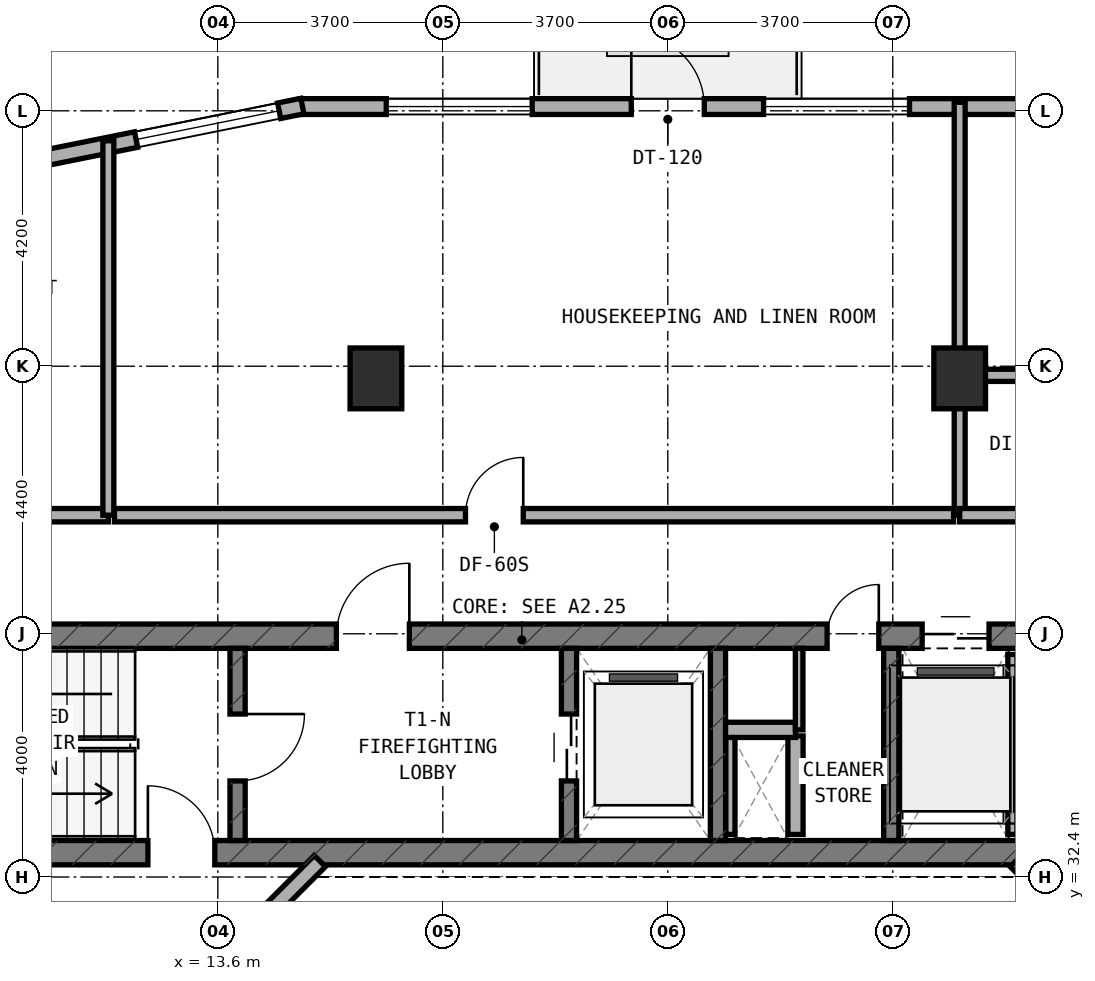
"""IFC4 building model, lengths in metres.
Left out: names, types, materials, properties, quantities, classifications, styles, units other than length and angle.
Written with IfcOpenShell. Run it as: python <this file> out.ifc"""

import sys

from ifc_helpers import new_model, si_unit, direction, frame, frame_2d, origin, origin_2d, place, context, subcontext, project, spatial, rectangle, extrude, element, fill, save


model = new_model("IFC4")
c1 = context("Model", 3, precision=1e-05, world=origin(), true_north=direction((0.0, 1.0)))
c2 = subcontext(c1, "Body", "Model", "MODEL_VIEW")
j1 = project(units=[si_unit("LENGTHUNIT", "METRE"), si_unit("PLANEANGLEUNIT", "RADIAN")], contexts=[c1])
p1 = place(None, origin())
s1 = spatial("IfcSite", under=j1, at=p1, CompositionType="ELEMENT")
p2 = place(p1, origin())
s2 = spatial("IfcBuilding", under=s1, at=p2, CompositionType="ELEMENT")
p3 = place(p2, frame((0.0, 0.0, 112.5)))
s3 = spatial("IfcBuildingStorey", under=s2, at=p3, CompositionType="ELEMENT", Elevation=112.5)
p4 = place(p3, frame((6.4, 32.8, 0.0), z_axis=(0.0, 0.0, 1.0), x_axis=(1.0, 0.0, 0.0)))
e1 = element("IfcWall", 1, at=p4, inside=s3, PredefinedType="SHEAR", context=c2, shape_type="SweptSolid", body=[
    extrude(rectangle(XDim=24.4, YDim=0.4, at=frame_2d((12.2, 0.0))), origin(), (0.0, 0.0, 1.0), 3.5),
])
p5 = place(p4, frame((6.05, 0.0, 0.0)))
e2 = element("IfcOpeningElement", 2, at=p5, cuts=e1, PredefinedType="OPENING", context=c2, shape_type="SweptSolid", body=[
    extrude(rectangle(XDim=1.1, YDim=2.15, at=frame_2d((0.55, 1.075))), frame((0.0, 0.21, 0.0), z_axis=(0.0, -1.0, 0.0), x_axis=(1.0, 0.0, 0.0)), (0.0, 0.0, 1.0), 0.42),
])
p6 = place(p3, frame((6.4, 36.36, 0.0), z_axis=(0.0, 0.0, 1.0), x_axis=(1.0, 0.0, 0.0)))
e3 = element("IfcWall", 3, at=p6, inside=s3, PredefinedType="SHEAR", context=c2, shape_type="SweptSolid", body=[
    extrude(rectangle(XDim=24.4, YDim=0.4, at=frame_2d((12.2, 0.0))), origin(), (0.0, 0.0, 1.0), 3.5),
])
p7 = place(p6, frame((9.15, 0.0, 0.0)))
e4 = element("IfcOpeningElement", 4, at=p7, cuts=e3, PredefinedType="OPENING", context=c2, shape_type="SweptSolid", body=[
    extrude(rectangle(XDim=1.2, YDim=2.15, at=frame_2d((0.6, 1.075))), frame((0.0, 0.21, 0.0), z_axis=(0.0, -1.0, 0.0), x_axis=(1.0, 0.0, 0.0)), (0.0, 0.0, 1.0), 0.42),
])
p8 = place(p6, frame((17.22, 0.0, 0.0)))
e5 = element("IfcOpeningElement", 5, at=p8, cuts=e3, PredefinedType="OPENING", context=c2, shape_type="SweptSolid", body=[
    extrude(rectangle(XDim=0.85, YDim=2.1, at=frame_2d((0.425, 1.05))), frame((0.0, 0.21, 0.0), z_axis=(0.0, -1.0, 0.0), x_axis=(1.0, 0.0, 0.0)), (0.0, 0.0, 1.0), 0.42),
])
p9 = place(p6, frame((18.783, 0.0, 0.0)))
e6 = element("IfcOpeningElement", 6, at=p9, cuts=e3, PredefinedType="OPENING", context=c2, shape_type="SweptSolid", body=[
    extrude(rectangle(XDim=1.1, YDim=2.15, at=frame_2d((0.55, 1.075))), frame((0.0, 0.21, 0.0), z_axis=(0.0, -1.0, 0.0), x_axis=(1.0, 0.0, 0.0)), (0.0, 0.0, 1.0), 0.42),
])
p10 = place(p6, frame((20.65, 0.0, 0.0)))
e7 = element("IfcOpeningElement", 7, at=p10, cuts=e3, PredefinedType="OPENING", context=c2, shape_type="SweptSolid", body=[
    extrude(rectangle(XDim=1.1, YDim=2.15, at=frame_2d((0.55, 1.075))), frame((0.0, 0.21, 0.0), z_axis=(0.0, -1.0, 0.0), x_axis=(1.0, 0.0, 0.0)), (0.0, 0.0, 1.0), 0.42),
])
p11 = place(p6, frame((22.517, 0.0, 0.0)))
e8 = element("IfcOpeningElement", 8, at=p11, cuts=e3, PredefinedType="OPENING", context=c2, shape_type="SweptSolid", body=[
    extrude(rectangle(XDim=1.1, YDim=2.15, at=frame_2d((0.55, 1.075))), frame((0.0, 0.21, 0.0), z_axis=(0.0, -1.0, 0.0), x_axis=(1.0, 0.0, 0.0)), (0.0, 0.0, 1.0), 0.42),
])
p12 = place(p3, frame((13.925, 33.0, 0.0), z_axis=(0.0, 0.0, 1.0), x_axis=(0.0, 1.0, 0.0)))
e9 = element("IfcWall", 9, at=p12, inside=s3, PredefinedType="STANDARD", context=c2, shape_type="SweptSolid", body=[
    extrude(rectangle(XDim=3.16, YDim=0.25, at=frame_2d((1.58, 0.0))), origin(), (0.0, 0.0, 1.0), 3.22),
])
p13 = place(p12, frame((0.98, 0.0, 0.0)))
e10 = element("IfcOpeningElement", 10, at=p13, cuts=e9, PredefinedType="OPENING", context=c2, shape_type="SweptSolid", body=[
    extrude(rectangle(XDim=1.1, YDim=2.15, at=frame_2d((0.55, 1.075))), frame((0.0, 0.135, 0.0), z_axis=(0.0, -1.0, 0.0), x_axis=(1.0, 0.0, 0.0)), (0.0, 0.0, 1.0), 0.27),
])
p14 = place(p3, frame((19.375, 33.0, 0.0), z_axis=(0.0, 0.0, 1.0), x_axis=(0.0, 1.0, 0.0)))
e11 = element("IfcWall", 11, at=p14, inside=s3, PredefinedType="STANDARD", context=c2, shape_type="SweptSolid", body=[
    extrude(rectangle(XDim=3.16, YDim=0.25, at=frame_2d((1.58, 0.0))), origin(), (0.0, 0.0, 1.0), 3.22),
])
p15 = place(p14, frame((0.98, 0.0, 0.0)))
e12 = element("IfcOpeningElement", 12, at=p15, cuts=e11, PredefinedType="OPENING", context=c2, shape_type="SweptSolid", body=[
    extrude(rectangle(XDim=1.1, YDim=2.15, at=frame_2d((0.55, 1.075))), frame((0.0, 0.135, 0.0), z_axis=(0.0, -1.0, 0.0), x_axis=(1.0, 0.0, 0.0)), (0.0, 0.0, 1.0), 0.27),
])
for number, where, z_axis, x_axis in (
    (13, (21.825, 33.0, 0.0), (0.0, 0.0, 1.0), (0.0, 1.0, 0.0)),
    (14, (24.675, 33.0, 0.0), (0.0, 0.0, 1.0), (0.0, 1.0, 0.0)),
):
    element("IfcWall", number, at=place(p3, frame(where, z_axis=z_axis, x_axis=x_axis)), inside=s3, PredefinedType="STANDARD", context=c2, shape_type="SweptSolid", body=[
        extrude(rectangle(XDim=3.16, YDim=0.25, at=frame_2d((1.58, 0.0))), origin(), (0.0, 0.0, 1.0), 3.22),
    ])
for number, where, z_axis, x_axis in (
    (15, (16.2, 40.6, 0.0), (0.0, 0.0, 1.0), (1.0, 0.0, 0.0)),
    (16, (25.8, 40.6, 0.0), (0.0, 0.0, 1.0), (1.0, 0.0, 0.0)),
):
    element("IfcColumn", number, at=place(p3, frame(where, z_axis=z_axis, x_axis=x_axis)), inside=s3, PredefinedType="COLUMN", context=c2, shape_type="SweptSolid", body=[
        extrude(rectangle(XDim=0.85, YDim=1.0, at=origin_2d()), origin(), (0.0, 0.0, 1.0), 3.5),
    ])
p16 = place(p3, frame((27.085, 45.07, 0.0), z_axis=(0.0, 0.0, 1.0), x_axis=(-1.0, 0.0, 0.0)))
e17 = element("IfcWall", 17, at=p16, inside=s3, PredefinedType="STANDARD", context=c2, shape_type="SweptSolid", body=[
    extrude(rectangle(XDim=12.135, YDim=0.26, at=frame_2d((6.067, 0.0))), origin(), (0.0, 0.0, 1.0), 3.22),
])
p17 = place(p16, frame((5.485, 0.0, 0.0)))
e18 = element("IfcOpeningElement", 18, at=p17, cuts=e17, PredefinedType="OPENING", context=c2, shape_type="SweptSolid", body=[
    extrude(rectangle(XDim=1.2, YDim=2.15, at=frame_2d((0.6, 1.075))), frame((0.0, 0.14, 0.0), z_axis=(0.0, -1.0, 0.0), x_axis=(1.0, 0.0, 0.0)), (0.0, 0.0, 1.0), 0.28),
])
p18 = place(p16, frame((2.11, 0.0, 0.8)))
e19 = element("IfcOpeningElement", 19, at=p18, cuts=e17, PredefinedType="OPENING", context=c2, shape_type="SweptSolid", body=[
    extrude(rectangle(XDim=2.4, YDim=1.6, at=frame_2d((1.2, 0.8))), frame((0.0, 0.14, 0.0), z_axis=(0.0, -1.0, 0.0), x_axis=(1.0, 0.0, 0.0)), (0.0, 0.0, 1.0), 0.28),
])
p19 = place(p16, frame((8.315, 0.0, 0.8)))
e20 = element("IfcOpeningElement", 20, at=p19, cuts=e17, PredefinedType="OPENING", context=c2, shape_type="SweptSolid", body=[
    extrude(rectangle(XDim=2.4, YDim=1.6, at=frame_2d((1.2, 0.8))), frame((0.0, 0.14, 0.0), z_axis=(0.0, -1.0, 0.0), x_axis=(1.0, 0.0, 0.0)), (0.0, 0.0, 1.0), 0.28),
])
p20 = place(p3, frame((14.991, 45.078, 0.0), z_axis=(0.0, 0.0, 1.0), x_axis=(-0.980321298532, -0.197408590603, 0.0)))
e21 = element("IfcWall", 21, at=p20, inside=s3, PredefinedType="STANDARD", context=c2, shape_type="SweptSolid", body=[
    extrude(rectangle(XDim=9.153, YDim=0.26, at=frame_2d((4.577, 0.0))), origin(), (0.0, 0.0, 1.0), 3.22),
])
p21 = place(p20, frame((0.39, 0.0, 0.8)))
e22 = element("IfcOpeningElement", 22, at=p21, cuts=e21, PredefinedType="OPENING", context=c2, shape_type="SweptSolid", body=[
    extrude(rectangle(XDim=2.4, YDim=1.6, at=frame_2d((1.2, 0.8))), frame((0.0, 0.14, 0.0), z_axis=(0.0, -1.0, 0.0), x_axis=(1.0, 0.0, 0.0)), (0.0, 0.0, 1.0), 0.28),
])
p22 = place(p20, frame((5.066, 0.0, 0.8)))
e23 = element("IfcOpeningElement", 23, at=p22, cuts=e21, PredefinedType="OPENING", context=c2, shape_type="SweptSolid", body=[
    extrude(rectangle(XDim=2.4, YDim=1.6, at=frame_2d((1.2, 0.8))), frame((0.0, 0.14, 0.0), z_axis=(0.0, -1.0, 0.0), x_axis=(1.0, 0.0, 0.0)), (0.0, 0.0, 1.0), 0.28),
])
for number, where, z_axis, x_axis in (
    (24, (28.556, 30.828, 0.0), (0.0, 0.0, 1.0), (-0.707, 0.707, 0.0)),
    (25, (15.278, 32.662, 0.0), (0.0, 0.0, 1.0), (-0.707, -0.707, 0.0)),
):
    element("IfcWall", number, at=place(p3, frame(where, z_axis=z_axis, x_axis=x_axis)), inside=s3, PredefinedType="STANDARD", context=c2, shape_type="SweptSolid", body=[
        extrude(rectangle(XDim=2.594, YDim=0.26, at=frame_2d((1.297, 0.0))), origin(), (0.0, 0.0, 1.0), 3.22),
    ])
p23 = place(p3, frame((22.03, 33.1, 0.0), z_axis=(0.0, 0.0, 1.0), x_axis=(0.0, 1.0, 0.0)))
e26 = element("IfcWall", 26, at=p23, inside=s3, PredefinedType="PARTITIONING", context=c2, shape_type="SweptSolid", body=[
    extrude(rectangle(XDim=1.62, YDim=0.15, at=frame_2d((0.81, 0.0))), origin(), (0.0, 0.0, 1.0), 3.22),
])
p24 = place(p3, frame((23.1, 33.1, 0.0), z_axis=(0.0, 0.0, 1.0), x_axis=(0.0, 1.0, 0.0)))
e27 = element("IfcWall", 27, at=p24, inside=s3, PredefinedType="SOLIDWALL", context=c2, shape_type="SweptSolid", body=[
    extrude(rectangle(XDim=1.62, YDim=0.25, at=frame_2d((0.81, 0.0))), origin(), (0.0, 0.0, 1.0), 3.22),
])
p25 = place(p3, frame((21.95, 34.82, 0.0), z_axis=(0.0, 0.0, 1.0), x_axis=(1.0, 0.0, 0.0)))
e28 = element("IfcWall", 28, at=p25, inside=s3, PredefinedType="SOLIDWALL", context=c2, shape_type="SweptSolid", body=[
    extrude(rectangle(XDim=1.15, YDim=0.25, at=frame_2d((0.575, 0.0))), origin(), (0.0, 0.0, 1.0), 3.22),
])
p26 = place(p3, frame((23.16, 34.82, 0.0), z_axis=(0.0, 0.0, 1.0), x_axis=(0.0, 1.0, 0.0)))
e29 = element("IfcWall", 29, at=p26, inside=s3, PredefinedType="PARTITIONING", context=c2, shape_type="SweptSolid", body=[
    extrude(rectangle(XDim=1.34, YDim=0.125, at=frame_2d((0.67, 0.0))), origin(), (0.0, 0.0, 1.0), 3.22),
])
p27 = place(p3, frame((26.667, 33.1, 0.0), z_axis=(0.0, 0.0, 1.0), x_axis=(0.0, 1.0, 0.0)))
e30 = element("IfcWall", 30, at=p27, inside=s3, PredefinedType="PARTITIONING", context=c2, shape_type="SweptSolid", body=[
    extrude(rectangle(XDim=2.96, YDim=0.15, at=frame_2d((1.48, 0.0))), origin(), (0.0, 0.0, 1.0), 3.22),
])
p28 = place(p3, frame((5.55, 38.35, 0.0), z_axis=(0.0, 0.0, 1.0), x_axis=(1.0, 0.0, 0.0)))
e31 = element("IfcWall", 31, at=p28, inside=s3, PredefinedType="SOLIDWALL", context=c2, shape_type="SweptSolid", body=[
    extrude(rectangle(XDim=6.25, YDim=0.22, at=frame_2d((3.125, 0.0))), origin(), (0.0, 0.0, 1.0), 2.695),
])
p29 = place(p28, frame((2.93, 0.0, 0.0)))
e32 = element("IfcOpeningElement", 32, at=p29, cuts=e31, PredefinedType="OPENING", context=c2, shape_type="SweptSolid", body=[
    extrude(rectangle(XDim=0.95, YDim=2.1, at=frame_2d((0.475, 1.05))), frame((0.0, 0.12, 0.0), z_axis=(0.0, -1.0, 0.0), x_axis=(1.0, 0.0, 0.0)), (0.0, 0.0, 1.0), 0.24),
])
p30 = place(p3, frame((11.8, 38.35, 0.0), z_axis=(0.0, 0.0, 1.0), x_axis=(0.0, 1.0, 0.0)))
e33 = element("IfcWall", 33, at=p30, inside=s3, PredefinedType="SOLIDWALL", context=c2, shape_type="SweptSolid", body=[
    extrude(rectangle(XDim=6.157, YDim=0.18, at=frame_2d((3.079, 0.0))), origin(), (0.0, 0.0, 1.0), 2.835),
])
p31 = place(p3, frame((11.9, 38.35, 0.0), z_axis=(0.0, 0.0, 1.0), x_axis=(1.0, 0.0, 0.0)))
e34 = element("IfcWall", 34, at=p31, inside=s3, PredefinedType="SOLIDWALL", context=c2, shape_type="SweptSolid", body=[
    extrude(rectangle(XDim=13.8, YDim=0.22, at=frame_2d((6.9, 0.0))), origin(), (0.0, 0.0, 1.0), 2.695),
])
p32 = place(p31, frame((5.773, 0.0, 0.0)))
e35 = element("IfcOpeningElement", 35, at=p32, cuts=e34, PredefinedType="OPENING", context=c2, shape_type="SweptSolid", body=[
    extrude(rectangle(XDim=0.95, YDim=2.1, at=frame_2d((0.475, 1.05))), frame((0.0, 0.12, 0.0), z_axis=(0.0, -1.0, 0.0), x_axis=(1.0, 0.0, 0.0)), (0.0, 0.0, 1.0), 0.24),
])
p33 = place(p3, frame((25.8, 38.35, 0.0), z_axis=(0.0, 0.0, 1.0), x_axis=(0.0, 1.0, 0.0)))
e36 = element("IfcWall", 36, at=p33, inside=s3, PredefinedType="SOLIDWALL", context=c2, shape_type="SweptSolid", body=[
    extrude(rectangle(XDim=6.79, YDim=0.18, at=frame_2d((3.395, 0.0))), origin(), (0.0, 0.0, 1.0), 2.695),
])
p34 = place(p3, frame((25.9, 40.65, 0.0), z_axis=(0.0, 0.0, 1.0), x_axis=(1.0, 0.0, 0.0)))
e37 = element("IfcWall", 37, at=p34, inside=s3, PredefinedType="PLUMBINGWALL", context=c2, shape_type="SweptSolid", body=[
    extrude(rectangle(XDim=2.0, YDim=0.2, at=frame_2d((1.0, 0.0))), origin(), (0.0, 0.0, 1.0), 2.835),
])
p35 = place(p3, frame((25.8, 38.35, 0.0), z_axis=(0.0, 0.0, 1.0), x_axis=(1.0, 0.0, 0.0)))
e38 = element("IfcWall", 38, at=p35, inside=s3, PredefinedType="SOLIDWALL", context=c2, shape_type="SweptSolid", body=[
    extrude(rectangle(XDim=2.2, YDim=0.22, at=frame_2d((1.1, 0.0))), origin(), (0.0, 0.0, 1.0), 2.695),
])
p36 = place(p17, frame((1.2, 0.0, 0.0), z_axis=(0.0, 0.0, 1.0), x_axis=(-1.0, 0.0, 0.0)))
e39 = element("IfcDoor", 39, at=p36, inside=s3, OperationType="SINGLE_SWING_LEFT", PredefinedType="DOOR", context=c2, shape_type="SweptSolid", body=[
    extrude(rectangle(XDim=1.2, YDim=2.15, at=frame_2d((0.6, 1.075))), frame((0.0, 0.025, 0.0), z_axis=(0.0, -1.0, 0.0), x_axis=(1.0, 0.0, 0.0)), (0.0, 0.0, 1.0), 0.05),
])
fill(e18, e39)
p37 = place(p18, origin())
e40 = element("IfcWindow", 40, at=p37, inside=s3, PartitioningType="SINGLE_PANEL", PredefinedType="WINDOW", context=c2, shape_type="SweptSolid", body=[
    extrude(rectangle(XDim=2.4, YDim=1.6, at=frame_2d((1.2, 0.8))), frame((0.0, 0.03, 0.0), z_axis=(0.0, -1.0, 0.0), x_axis=(1.0, 0.0, 0.0)), (0.0, 0.0, 1.0), 0.06),
])
fill(e19, e40)
p38 = place(p19, origin())
e41 = element("IfcWindow", 41, at=p38, inside=s3, PartitioningType="SINGLE_PANEL", PredefinedType="WINDOW", context=c2, shape_type="SweptSolid", body=[
    extrude(rectangle(XDim=2.4, YDim=1.6, at=frame_2d((1.2, 0.8))), frame((0.0, 0.03, 0.0), z_axis=(0.0, -1.0, 0.0), x_axis=(1.0, 0.0, 0.0)), (0.0, 0.0, 1.0), 0.06),
])
fill(e20, e41)
p39 = place(p21, origin())
e42 = element("IfcWindow", 42, at=p39, inside=s3, PartitioningType="SINGLE_PANEL", PredefinedType="WINDOW", context=c2, shape_type="SweptSolid", body=[
    extrude(rectangle(XDim=2.4, YDim=1.6, at=frame_2d((1.2, 0.8))), frame((0.0, 0.03, 0.0), z_axis=(0.0, -1.0, 0.0), x_axis=(1.0, 0.0, 0.0)), (0.0, 0.0, 1.0), 0.06),
])
fill(e22, e42)
p40 = place(p13, frame((1.1, 0.0, 0.0), z_axis=(0.0, 0.0, 1.0), x_axis=(-1.0, 0.0, 0.0)))
e43 = element("IfcDoor", 43, at=p40, inside=s3, OperationType="SINGLE_SWING_LEFT", PredefinedType="DOOR", context=c2, shape_type="SweptSolid", body=[
    extrude(rectangle(XDim=1.1, YDim=2.15, at=frame_2d((0.55, 1.075))), frame((0.0, 0.025, 0.0), z_axis=(0.0, -1.0, 0.0), x_axis=(1.0, 0.0, 0.0)), (0.0, 0.0, 1.0), 0.05),
])
fill(e10, e43)
p41 = place(p7, origin())
e44 = element("IfcDoor", 44, at=p41, inside=s3, OperationType="SINGLE_SWING_RIGHT", PredefinedType="DOOR", context=c2, shape_type="SweptSolid", body=[
    extrude(rectangle(XDim=1.2, YDim=2.15, at=frame_2d((0.6, 1.075))), frame((0.0, 0.025, 0.0), z_axis=(0.0, -1.0, 0.0), x_axis=(1.0, 0.0, 0.0)), (0.0, 0.0, 1.0), 0.05),
])
fill(e4, e44)
p42 = place(p15, origin())
e45 = element("IfcDoor", 45, at=p42, inside=s3, OperationType="DOUBLE_DOOR_SLIDING", PredefinedType="DOOR", context=c2, shape_type="SweptSolid", body=[
    extrude(rectangle(XDim=1.1, YDim=2.15, at=frame_2d((0.55, 1.075))), frame((0.0, 0.025, 0.0), z_axis=(0.0, -1.0, 0.0), x_axis=(1.0, 0.0, 0.0)), (0.0, 0.0, 1.0), 0.05),
])
fill(e12, e45)
p43 = place(p8, origin())
e46 = element("IfcDoor", 46, at=p43, inside=s3, OperationType="SINGLE_SWING_RIGHT", PredefinedType="DOOR", context=c2, shape_type="SweptSolid", body=[
    extrude(rectangle(XDim=0.85, YDim=2.1, at=frame_2d((0.425, 1.05))), frame((0.0, 0.025, 0.0), z_axis=(0.0, -1.0, 0.0), x_axis=(1.0, 0.0, 0.0)), (0.0, 0.0, 1.0), 0.05),
])
fill(e5, e46)
p44 = place(p9, origin())
e47 = element("IfcDoor", 47, at=p44, inside=s3, OperationType="DOUBLE_DOOR_SLIDING", PredefinedType="DOOR", context=c2, shape_type="SweptSolid", body=[
    extrude(rectangle(XDim=1.1, YDim=2.15, at=frame_2d((0.55, 1.075))), frame((0.0, 0.025, 0.0), z_axis=(0.0, -1.0, 0.0), x_axis=(1.0, 0.0, 0.0)), (0.0, 0.0, 1.0), 0.05),
])
fill(e6, e47)
p45 = place(p5, origin())
e48 = element("IfcDoor", 48, at=p45, inside=s3, OperationType="SINGLE_SWING_LEFT", PredefinedType="DOOR", context=c2, shape_type="SweptSolid", body=[
    extrude(rectangle(XDim=1.1, YDim=2.15, at=frame_2d((0.55, 1.075))), frame((0.0, 0.025, 0.0), z_axis=(0.0, -1.0, 0.0), x_axis=(1.0, 0.0, 0.0)), (0.0, 0.0, 1.0), 0.05),
])
fill(e2, e48)
p46 = place(p32, origin())
e49 = element("IfcDoor", 49, at=p46, inside=s3, OperationType="SINGLE_SWING_RIGHT", PredefinedType="DOOR", context=c2, shape_type="SweptSolid", body=[
    extrude(rectangle(XDim=0.95, YDim=2.1, at=frame_2d((0.475, 1.05))), frame((0.0, 0.025, 0.0), z_axis=(0.0, -1.0, 0.0), x_axis=(1.0, 0.0, 0.0)), (0.0, 0.0, 1.0), 0.05),
])
fill(e35, e49)
save(model, sys.argv[1])
